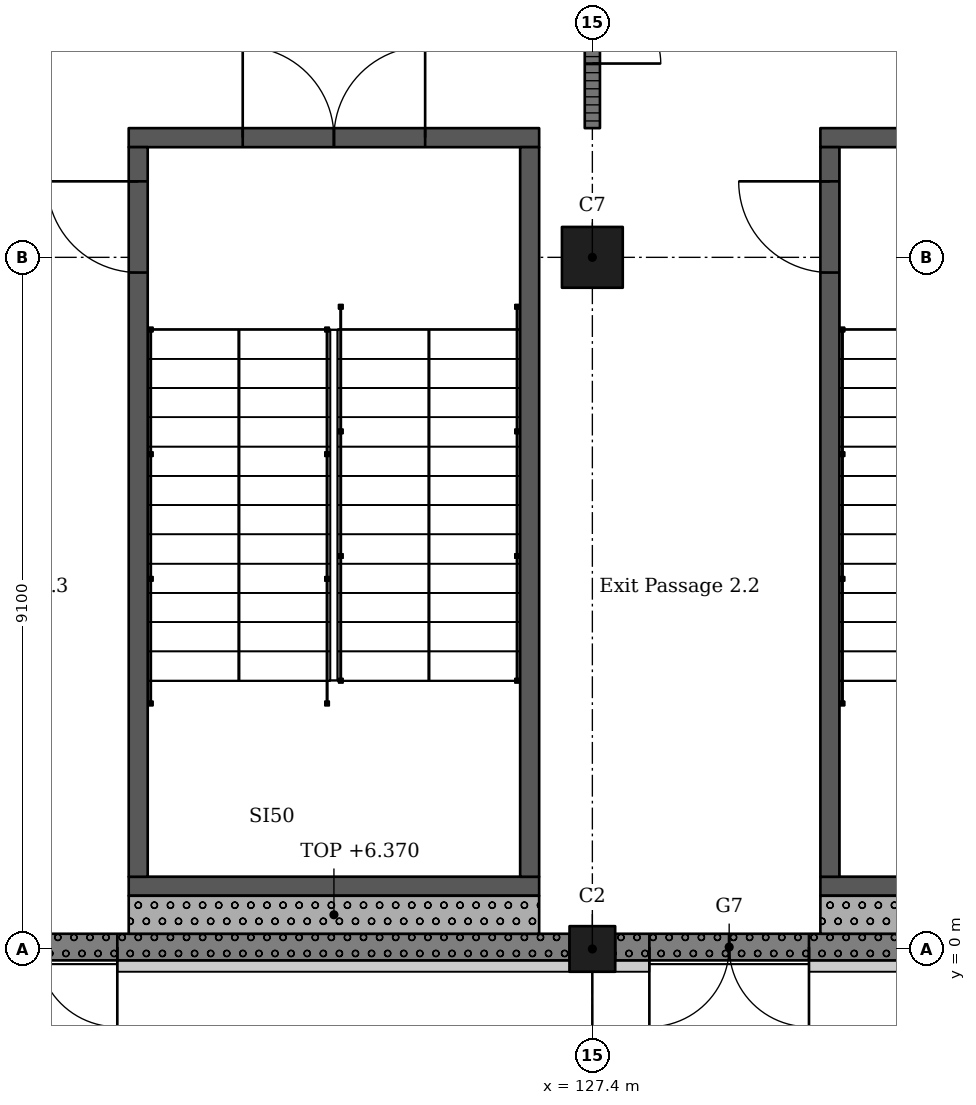
"""IFC4 building model, lengths in metres.
Left out: names, types, materials, properties, quantities, classifications, styles, units other than length and angle.
Written with IfcOpenShell. Run it as: python <this file> out.ifc"""

import sys

from ifc_helpers import new_model, si_unit, direction, frame, frame_2d, origin, origin_2d, place, context, subcontext, project, spatial, rectangle, extrude, element, fill, save


model = new_model("IFC4")
c1 = context("Model", 3, precision=1e-05, world=origin(), true_north=direction((0.0, 1.0)))
c2 = subcontext(c1, "Body", "Model", "MODEL_VIEW")
j1 = project(units=[si_unit("LENGTHUNIT", "METRE"), si_unit("PLANEANGLEUNIT", "RADIAN")], contexts=[c1])
p1 = place(None, origin())
s1 = spatial("IfcSite", under=j1, at=p1, CompositionType="ELEMENT")
p2 = place(p1, origin())
s2 = spatial("IfcBuilding", under=s1, at=p2, CompositionType="ELEMENT")
p3 = place(p2, origin())
s3 = spatial("IfcBuildingStorey", under=s2, at=p3, CompositionType="ELEMENT", Elevation=0.0)
p4 = place(p3, frame((127.4, 0.0, -0.4), z_axis=(0.0, 0.0, 1.0), x_axis=(1.0, 0.0, 0.0)))
e1 = element("IfcColumn", 1, at=p4, inside=s3, PredefinedType="COLUMN", context=c2, shape_type="SweptSolid", body=[
    extrude(rectangle(XDim=0.6, YDim=0.6, at=origin_2d()), origin(), (0.0, 0.0, 1.0), 6.77),
])
p5 = place(p3, frame((127.4, 9.1, -0.4), z_axis=(0.0, 0.0, 1.0), x_axis=(1.0, 0.0, 0.0)))
e2 = element("IfcColumn", 2, at=p5, inside=s3, PredefinedType="COLUMN", context=c2, shape_type="SweptSolid", body=[
    extrude(rectangle(XDim=0.8, YDim=0.8, at=origin_2d()), origin(), (0.0, 0.0, 1.0), 6.77),
])
p6 = place(p3, frame((135.8, 0.825, -0.4), z_axis=(0.0, 0.0, 1.0), x_axis=(-1.0, 0.0, 0.0)))
e3 = element("IfcWall", 3, at=p6, inside=s3, PredefinedType="SHEAR", context=c2, shape_type="SweptSolid", body=[
    extrude(rectangle(XDim=5.4, YDim=0.25, at=frame_2d((2.7, 0.0))), origin(), (0.0, 0.0, 1.0), 6.77),
])
p7 = place(p3, frame((135.8, 10.675, -0.4), z_axis=(0.0, 0.0, 1.0), x_axis=(-1.0, 0.0, 0.0)))
e4 = element("IfcWall", 4, at=p7, inside=s3, PredefinedType="SHEAR", context=c2, shape_type="SweptSolid", body=[
    extrude(rectangle(XDim=5.4, YDim=0.25, at=frame_2d((2.7, 0.0))), origin(), (0.0, 0.0, 1.0), 6.77),
])
p8 = place(p7, frame((1.5, 0.0, 0.4)))
e5 = element("IfcOpeningElement", 5, at=p8, cuts=e4, PredefinedType="OPENING", context=c2, shape_type="SweptSolid", body=[
    extrude(rectangle(XDim=2.4, YDim=2.1, at=frame_2d((1.2, 1.05))), frame((0.0, 0.135, 0.0), z_axis=(0.0, -1.0, 0.0), x_axis=(1.0, 0.0, 0.0)), (0.0, 0.0, 1.0), 0.27),
])
p9 = place(p3, frame((130.525, 10.55, -0.4), z_axis=(0.0, 0.0, 1.0), x_axis=(0.0, -1.0, 0.0)))
e6 = element("IfcWall", 6, at=p9, inside=s3, PredefinedType="SHEAR", context=c2, shape_type="SweptSolid", body=[
    extrude(rectangle(XDim=9.6, YDim=0.25, at=frame_2d((4.8, 0.0))), origin(), (0.0, 0.0, 1.0), 6.77),
])
p10 = place(p9, frame((0.45, 0.0, 0.4)))
e7 = element("IfcOpeningElement", 7, at=p10, cuts=e6, PredefinedType="OPENING", context=c2, shape_type="SweptSolid", body=[
    extrude(rectangle(XDim=1.2, YDim=2.1, at=frame_2d((0.6, 1.05))), frame((0.0, 0.135, 0.0), z_axis=(0.0, -1.0, 0.0), x_axis=(1.0, 0.0, 0.0)), (0.0, 0.0, 1.0), 0.27),
])
p11 = place(p3, frame((126.7, 0.825, -0.4), z_axis=(0.0, 0.0, 1.0), x_axis=(-1.0, 0.0, 0.0)))
e8 = element("IfcWall", 8, at=p11, inside=s3, PredefinedType="SHEAR", context=c2, shape_type="SweptSolid", body=[
    extrude(rectangle(XDim=5.4, YDim=0.25, at=frame_2d((2.7, 0.0))), origin(), (0.0, 0.0, 1.0), 6.77),
])
p12 = place(p3, frame((126.7, 10.675, -0.4), z_axis=(0.0, 0.0, 1.0), x_axis=(-1.0, 0.0, 0.0)))
e9 = element("IfcWall", 9, at=p12, inside=s3, PredefinedType="SHEAR", context=c2, shape_type="SweptSolid", body=[
    extrude(rectangle(XDim=5.4, YDim=0.25, at=frame_2d((2.7, 0.0))), origin(), (0.0, 0.0, 1.0), 6.77),
])
p13 = place(p12, frame((1.5, 0.0, 0.4)))
e10 = element("IfcOpeningElement", 10, at=p13, cuts=e9, PredefinedType="OPENING", context=c2, shape_type="SweptSolid", body=[
    extrude(rectangle(XDim=2.4, YDim=2.1, at=frame_2d((1.2, 1.05))), frame((0.0, 0.135, 0.0), z_axis=(0.0, -1.0, 0.0), x_axis=(1.0, 0.0, 0.0)), (0.0, 0.0, 1.0), 0.27),
])
p14 = place(p3, frame((121.425, 10.55, -0.4), z_axis=(0.0, 0.0, 1.0), x_axis=(0.0, -1.0, 0.0)))
e11 = element("IfcWall", 11, at=p14, inside=s3, PredefinedType="SHEAR", context=c2, shape_type="SweptSolid", body=[
    extrude(rectangle(XDim=9.6, YDim=0.25, at=frame_2d((4.8, 0.0))), origin(), (0.0, 0.0, 1.0), 6.77),
])
p15 = place(p14, frame((0.45, 0.0, 0.4)))
e12 = element("IfcOpeningElement", 12, at=p15, cuts=e11, PredefinedType="OPENING", context=c2, shape_type="SweptSolid", body=[
    extrude(rectangle(XDim=1.2, YDim=2.1, at=frame_2d((0.6, 1.05))), frame((0.0, 0.135, 0.0), z_axis=(0.0, -1.0, 0.0), x_axis=(1.0, 0.0, 0.0)), (0.0, 0.0, 1.0), 0.27),
])
p16 = place(p3, frame((126.575, 10.55, -0.4), z_axis=(0.0, 0.0, 1.0), x_axis=(0.0, -1.0, 0.0)))
e13 = element("IfcWall", 13, at=p16, inside=s3, PredefinedType="SHEAR", context=c2, shape_type="SweptSolid", body=[
    extrude(rectangle(XDim=9.6, YDim=0.25, at=frame_2d((4.8, 0.0))), origin(), (0.0, 0.0, 1.0), 6.77),
])
p17 = place(p3, frame((118.6, 0.025, 0.0), z_axis=(0.0, 0.0, 1.0), x_axis=(1.0, 0.0, 0.0)))
e14 = element("IfcWall", 14, at=p17, inside=s3, PredefinedType="SOLIDWALL", context=c2, shape_type="SweptSolid", body=[
    extrude(rectangle(XDim=8.5, YDim=0.35, at=frame_2d((4.25, 0.0))), origin(), (0.0, 0.0, 1.0), 5.27),
])
p18 = place(p17, frame((0.45, 0.0, 0.0)))
e15 = element("IfcOpeningElement", 15, at=p18, cuts=e14, PredefinedType="OPENING", context=c2, shape_type="SweptSolid", body=[
    extrude(rectangle(XDim=2.1, YDim=2.4, at=frame_2d((1.05, 1.2))), frame((0.0, 0.185, 0.0), z_axis=(0.0, -1.0, 0.0), x_axis=(1.0, 0.0, 0.0)), (0.0, 0.0, 1.0), 0.37),
])
p19 = place(p3, frame((127.7, 0.025, 0.0), z_axis=(0.0, 0.0, 1.0), x_axis=(1.0, 0.0, 0.0)))
e16 = element("IfcWall", 16, at=p19, inside=s3, PredefinedType="SOLIDWALL", context=c2, shape_type="SweptSolid", body=[
    extrude(rectangle(XDim=8.5, YDim=0.35, at=frame_2d((4.25, 0.0))), origin(), (0.0, 0.0, 1.0), 5.27),
])
p20 = place(p19, frame((0.45, 0.0, 0.0)))
e17 = element("IfcOpeningElement", 17, at=p20, cuts=e16, PredefinedType="OPENING", context=c2, shape_type="SweptSolid", body=[
    extrude(rectangle(XDim=2.1, YDim=2.4, at=frame_2d((1.05, 1.2))), frame((0.0, 0.185, 0.0), z_axis=(0.0, -1.0, 0.0), x_axis=(1.0, 0.0, 0.0)), (0.0, 0.0, 1.0), 0.37),
])
p21 = place(p3, frame((130.4, 0.45, 0.0), z_axis=(0.0, 0.0, 1.0), x_axis=(1.0, 0.0, 0.0)))
e18 = element("IfcWall", 18, at=p21, inside=s3, PredefinedType="SOLIDWALL", context=c2, shape_type="SweptSolid", body=[
    extrude(rectangle(XDim=5.4, YDim=0.5, at=frame_2d((2.7, 0.0))), origin(), (0.0, 0.0, 1.0), 6.37),
])
p22 = place(p3, frame((121.3, 0.45, 0.0), z_axis=(0.0, 0.0, 1.0), x_axis=(1.0, 0.0, 0.0)))
e19 = element("IfcWall", 19, at=p22, inside=s3, PredefinedType="SOLIDWALL", context=c2, shape_type="SweptSolid", body=[
    extrude(rectangle(XDim=5.4, YDim=0.5, at=frame_2d((2.7, 0.0))), origin(), (0.0, 0.0, 1.0), 6.37),
])
p23 = place(p3, frame((127.4, 10.8, 0.0), z_axis=(0.0, 0.0, 1.0), x_axis=(0.0, 1.0, 0.0)))
e20 = element("IfcWall", 20, at=p23, inside=s3, PredefinedType="PARTITIONING", context=c2, shape_type="SweptSolid", body=[
    extrude(rectangle(XDim=6.95, YDim=0.2, at=frame_2d((3.475, 0.0))), origin(), (0.0, 0.0, 1.0), 5.32),
])
p24 = place(p23, frame((0.85, 0.0, 0.0)))
e21 = element("IfcOpeningElement", 21, at=p24, cuts=e20, PredefinedType="OPENING", context=c2, shape_type="SweptSolid", body=[
    extrude(rectangle(XDim=1.8, YDim=2.4, at=frame_2d((0.9, 1.2))), frame((0.0, 0.11, 0.0), z_axis=(0.0, -1.0, 0.0), x_axis=(1.0, 0.0, 0.0)), (0.0, 0.0, 1.0), 0.22),
])
p25 = place(p23, frame((4.35, 0.0, 0.0)))
e22 = element("IfcOpeningElement", 22, at=p25, cuts=e20, PredefinedType="OPENING", context=c2, shape_type="SweptSolid", body=[
    extrude(rectangle(XDim=1.8, YDim=2.4, at=frame_2d((0.9, 1.2))), frame((0.0, 0.11, 0.0), z_axis=(0.0, -1.0, 0.0), x_axis=(1.0, 0.0, 0.0)), (0.0, 0.0, 1.0), 0.22),
])
p26 = place(p18, frame((2.1, 0.0, 0.0), z_axis=(0.0, 0.0, 1.0), x_axis=(-1.0, 0.0, 0.0)))
e23 = element("IfcDoor", 23, at=p26, inside=s3, OperationType="DOUBLE_DOOR_SINGLE_SWING", PredefinedType="DOOR", context=c2, shape_type="SweptSolid", body=[
    extrude(rectangle(XDim=2.1, YDim=2.4, at=frame_2d((1.05, 1.2))), frame((0.0, 0.025, 0.0), z_axis=(0.0, -1.0, 0.0), x_axis=(1.0, 0.0, 0.0)), (0.0, 0.0, 1.0), 0.05),
])
fill(e15, e23)
p27 = place(p20, frame((2.1, 0.0, 0.0), z_axis=(0.0, 0.0, 1.0), x_axis=(-1.0, 0.0, 0.0)))
e24 = element("IfcDoor", 24, at=p27, inside=s3, OperationType="DOUBLE_DOOR_SINGLE_SWING", PredefinedType="DOOR", context=c2, shape_type="SweptSolid", body=[
    extrude(rectangle(XDim=2.1, YDim=2.4, at=frame_2d((1.05, 1.2))), frame((0.0, 0.025, 0.0), z_axis=(0.0, -1.0, 0.0), x_axis=(1.0, 0.0, 0.0)), (0.0, 0.0, 1.0), 0.05),
])
fill(e17, e24)
p28 = place(p24, origin())
e25 = element("IfcDoor", 25, at=p28, inside=s3, OperationType="DOUBLE_DOOR_SINGLE_SWING", PredefinedType="DOOR", context=c2, shape_type="SweptSolid", body=[
    extrude(rectangle(XDim=1.8, YDim=2.4, at=frame_2d((0.9, 1.2))), frame((0.0, 0.025, 0.0), z_axis=(0.0, -1.0, 0.0), x_axis=(1.0, 0.0, 0.0)), (0.0, 0.0, 1.0), 0.05),
])
fill(e21, e25)
p29 = place(p13, origin())
e26 = element("IfcDoor", 26, at=p29, inside=s3, OperationType="DOUBLE_DOOR_SINGLE_SWING", PredefinedType="DOOR", context=c2, shape_type="SweptSolid", body=[
    extrude(rectangle(XDim=2.4, YDim=2.1, at=frame_2d((1.2, 1.05))), frame((0.0, 0.025, 0.0), z_axis=(0.0, -1.0, 0.0), x_axis=(1.0, 0.0, 0.0)), (0.0, 0.0, 1.0), 0.05),
])
fill(e10, e26)
p30 = place(p10, origin())
e27 = element("IfcDoor", 27, at=p30, inside=s3, OperationType="SINGLE_SWING_LEFT", PredefinedType="DOOR", context=c2, shape_type="SweptSolid", body=[
    extrude(rectangle(XDim=1.2, YDim=2.1, at=frame_2d((0.6, 1.05))), frame((0.0, 0.025, 0.0), z_axis=(0.0, -1.0, 0.0), x_axis=(1.0, 0.0, 0.0)), (0.0, 0.0, 1.0), 0.05),
])
fill(e7, e27)
p31 = place(p15, origin())
e28 = element("IfcDoor", 28, at=p31, inside=s3, OperationType="SINGLE_SWING_LEFT", PredefinedType="DOOR", context=c2, shape_type="SweptSolid", body=[
    extrude(rectangle(XDim=1.2, YDim=2.1, at=frame_2d((0.6, 1.05))), frame((0.0, 0.025, 0.0), z_axis=(0.0, -1.0, 0.0), x_axis=(1.0, 0.0, 0.0)), (0.0, 0.0, 1.0), 0.05),
])
fill(e12, e28)
save(model, sys.argv[1])
